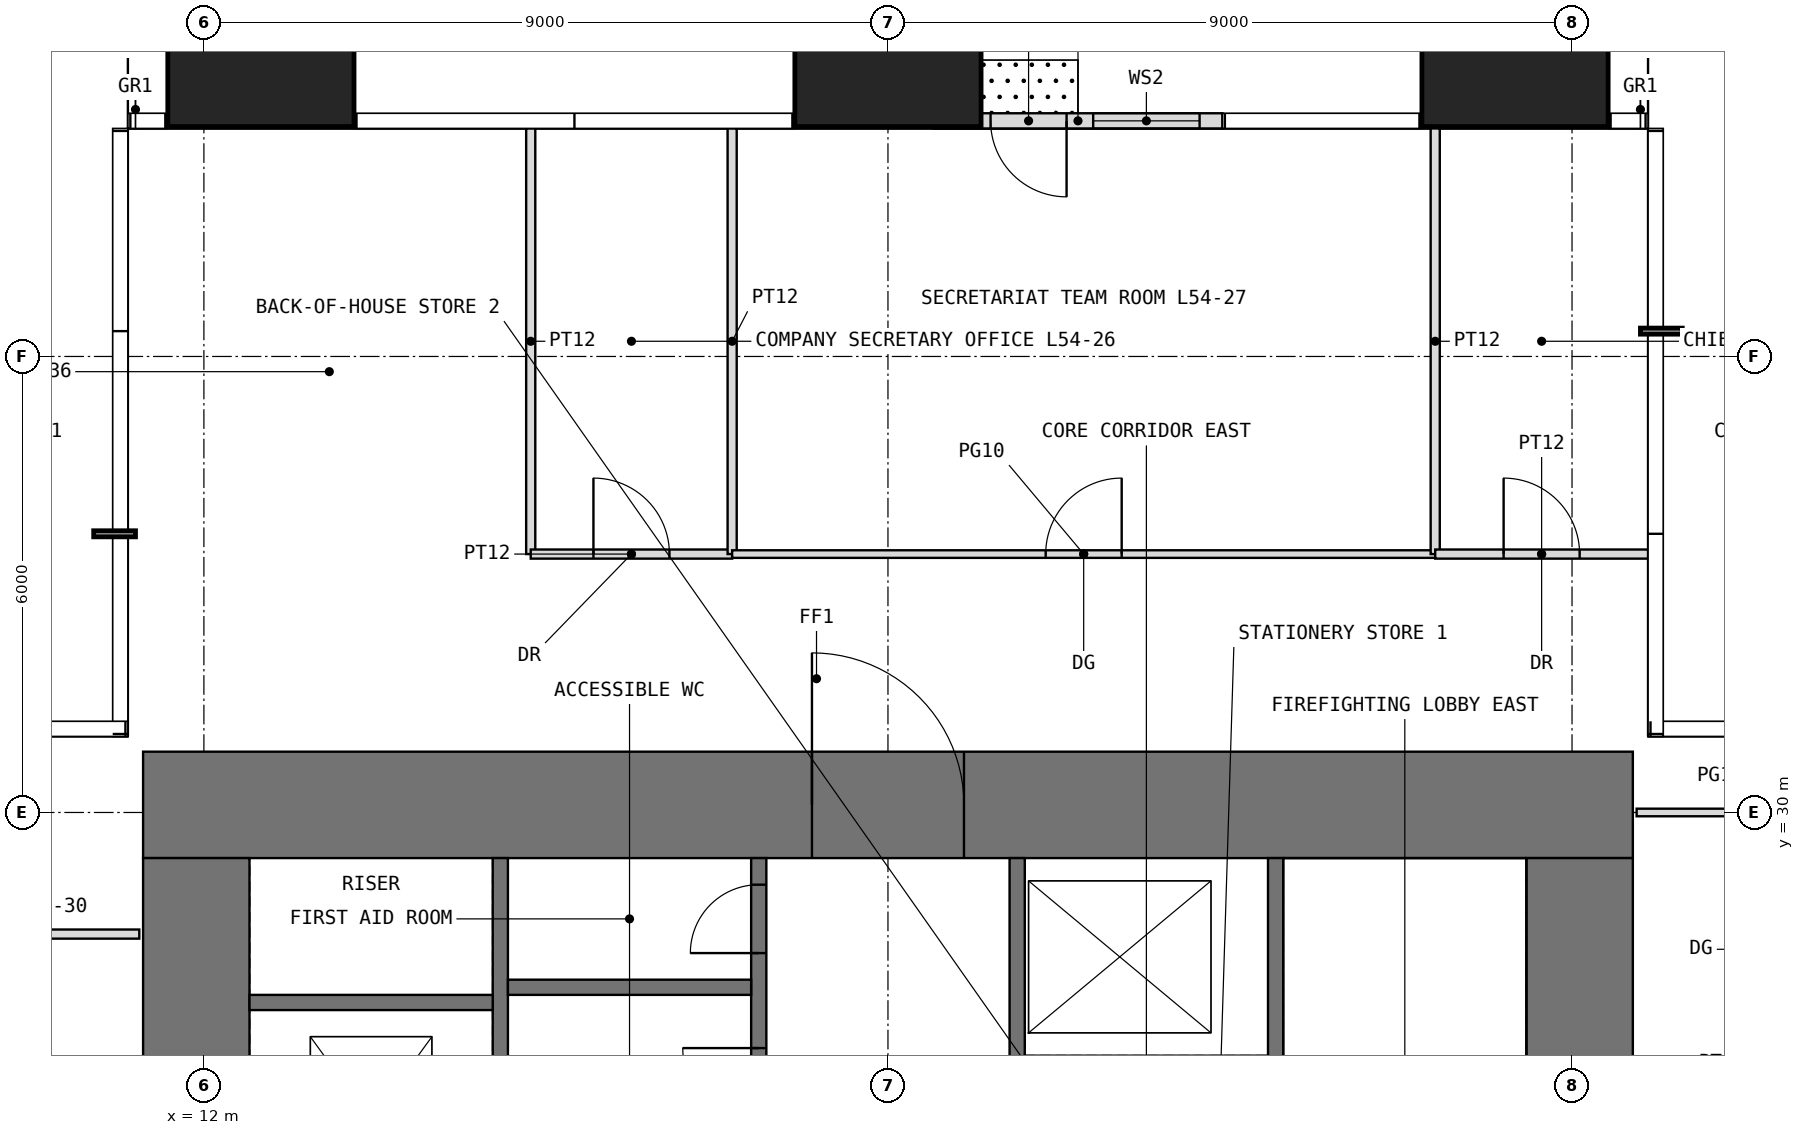
"""IFC4 building model, lengths in metres.
Left out: names, types, materials, properties, quantities, classifications, styles, units other than length and angle.
Written with IfcOpenShell. Run it as: python <this file> out.ifc"""

import sys

from ifc_helpers import new_model, si_unit, direction, frame, frame_2d, origin, origin_2d, place, context, subcontext, project, spatial, rectangle, extrude, element, fill, save


model = new_model("IFC4")
c1 = context("Model", 3, precision=1e-05, world=origin(), true_north=direction((0.0, 1.0)))
c2 = subcontext(c1, "Body", "Model", "MODEL_VIEW")
j1 = project(units=[si_unit("LENGTHUNIT", "METRE"), si_unit("PLANEANGLEUNIT", "RADIAN")], contexts=[c1])
p1 = place(None, origin())
s1 = spatial("IfcSite", under=j1, at=p1, CompositionType="ELEMENT")
p2 = place(p1, origin())
s2 = spatial("IfcBuilding", under=s1, at=p2, CompositionType="ELEMENT")
p3 = place(p2, frame((0.0, 0.0, 226.5)))
s3 = spatial("IfcBuildingStorey", under=s2, at=p3, CompositionType="ELEMENT", Elevation=226.5)
for number, where, z_axis, x_axis in (
    (1, (12.75, 40.25, 0.0), (0.0, 0.0, 1.0), (1.0, 0.0, 0.0)),
    (2, (21.0, 40.25, 0.0), (0.0, 0.0, 1.0), (1.0, 0.0, 0.0)),
    (3, (29.25, 40.25, 0.0), (0.0, 0.0, 1.0), (1.0, 0.0, 0.0)),
):
    element("IfcColumn", number, at=place(p3, frame(where, z_axis=z_axis, x_axis=x_axis)), inside=s3, PredefinedType="COLUMN", context=c2, shape_type="SweptSolid", body=[
        extrude(rectangle(XDim=2.45, YDim=2.45, at=origin_2d()), origin(), (0.0, 0.0, 1.0), 4.0),
    ])
p4 = place(p3, frame((25.4, 39.1, 0.0), z_axis=(0.0, 0.0, 1.0), x_axis=(-1.0, 0.0, 0.0)))
e4 = element("IfcWall", 4, at=p4, inside=s3, PredefinedType="USERDEFINED", context=c2, shape_type="SweptSolid", body=[
    extrude(rectangle(XDim=3.8, YDim=0.2, at=frame_2d((1.9, 0.0))), origin(), (0.0, 0.0, 1.0), 3.75),
])
p5 = place(p4, frame((2.05, 0.0, 0.0)))
e5 = element("IfcOpeningElement", 5, at=p5, cuts=e4, PredefinedType="OPENING", context=c2, shape_type="SweptSolid", body=[
    extrude(rectangle(XDim=1.0, YDim=2.4, at=frame_2d((0.5, 1.2))), frame((0.0, 0.11, 0.0), z_axis=(0.0, -1.0, 0.0), x_axis=(1.0, 0.0, 0.0)), (0.0, 0.0, 1.0), 0.22),
])
p6 = place(p4, frame((0.3, 0.0, 0.3)))
e6 = element("IfcOpeningElement", 6, at=p6, cuts=e4, PredefinedType="OPENING", context=c2, shape_type="SweptSolid", body=[
    extrude(rectangle(XDim=1.4, YDim=2.7, at=frame_2d((0.7, 1.35))), frame((0.0, 0.11, 0.0), z_axis=(0.0, -1.0, 0.0), x_axis=(1.0, 0.0, 0.0)), (0.0, 0.0, 1.0), 0.22),
])
p7 = place(p3, frame((11.2, 30.1, -0.05), z_axis=(0.0, 0.0, 1.0), x_axis=(1.0, 0.0, 0.0)))
e7 = element("IfcWall", 7, at=p7, inside=s3, PredefinedType="SHEAR", context=c2, shape_type="SweptSolid", body=[
    extrude(rectangle(XDim=19.6, YDim=1.4, at=frame_2d((9.8, 0.0))), origin(), (0.0, 0.0, 1.0), 4.0),
])
p8 = place(p7, frame((8.8, 0.0, 0.05)))
e8 = element("IfcOpeningElement", 8, at=p8, cuts=e7, PredefinedType="OPENING", context=c2, shape_type="SweptSolid", body=[
    extrude(rectangle(XDim=2.0, YDim=2.2, at=frame_2d((1.0, 1.1))), frame((0.0, 0.71, 0.0), z_axis=(0.0, -1.0, 0.0), x_axis=(1.0, 0.0, 0.0)), (0.0, 0.0, 1.0), 1.42),
])
p9 = place(p3, frame((11.9, 12.6, -0.05), z_axis=(0.0, 0.0, 1.0), x_axis=(0.0, 1.0, 0.0)))
e9 = element("IfcWall", 9, at=p9, inside=s3, PredefinedType="SHEAR", context=c2, shape_type="SweptSolid", body=[
    extrude(rectangle(XDim=16.8, YDim=1.4, at=frame_2d((8.4, 0.0))), origin(), (0.0, 0.0, 1.0), 4.0),
])
p10 = place(p9, frame((9.9, 0.0, 0.05)))
e10 = element("IfcOpeningElement", 10, at=p10, cuts=e9, PredefinedType="OPENING", context=c2, shape_type="SweptSolid", body=[
    extrude(rectangle(XDim=1.0, YDim=2.2, at=frame_2d((0.5, 1.1))), frame((0.0, 0.71, 0.0), z_axis=(0.0, -1.0, 0.0), x_axis=(1.0, 0.0, 0.0)), (0.0, 0.0, 1.0), 1.42),
])
p11 = place(p3, frame((30.1, 12.6, -0.05), z_axis=(0.0, 0.0, 1.0), x_axis=(0.0, 1.0, 0.0)))
e11 = element("IfcWall", 11, at=p11, inside=s3, PredefinedType="SHEAR", context=c2, shape_type="SweptSolid", body=[
    extrude(rectangle(XDim=16.8, YDim=1.4, at=frame_2d((8.4, 0.0))), origin(), (0.0, 0.0, 1.0), 4.0),
])
p12 = place(p11, frame((5.9, 0.0, 0.05)))
e12 = element("IfcOpeningElement", 12, at=p12, cuts=e11, PredefinedType="OPENING", context=c2, shape_type="SweptSolid", body=[
    extrude(rectangle(XDim=1.0, YDim=2.2, at=frame_2d((0.5, 1.1))), frame((0.0, 0.71, 0.0), z_axis=(0.0, -1.0, 0.0), x_axis=(1.0, 0.0, 0.0)), (0.0, 0.0, 1.0), 1.42),
])
p13 = place(p3, frame((15.9, 12.6, -0.05), z_axis=(0.0, 0.0, 1.0), x_axis=(0.0, 1.0, 0.0)))
e13 = element("IfcWall", 13, at=p13, inside=s3, PredefinedType="SHEAR", context=c2, shape_type="SweptSolid", body=[
    extrude(rectangle(XDim=16.8, YDim=0.2, at=frame_2d((8.4, 0.0))), origin(), (0.0, 0.0, 1.0), 4.0),
])
p14 = place(p13, frame((8.9, 0.0, 0.05)))
e14 = element("IfcOpeningElement", 14, at=p14, cuts=e13, PredefinedType="OPENING", context=c2, shape_type="SweptSolid", body=[
    extrude(rectangle(XDim=1.0, YDim=2.2, at=frame_2d((0.5, 1.1))), frame((0.0, 0.11, 0.0), z_axis=(0.0, -1.0, 0.0), x_axis=(1.0, 0.0, 0.0)), (0.0, 0.0, 1.0), 0.22),
])
p15 = place(p3, frame((19.3, 12.6, -0.05), z_axis=(0.0, 0.0, 1.0), x_axis=(0.0, 1.0, 0.0)))
e15 = element("IfcWall", 15, at=p15, inside=s3, PredefinedType="SHEAR", context=c2, shape_type="SweptSolid", body=[
    extrude(rectangle(XDim=16.8, YDim=0.2, at=frame_2d((8.4, 0.0))), origin(), (0.0, 0.0, 1.0), 4.0),
])
p16 = place(p15, frame((8.7, 0.0, 0.05)))
e16 = element("IfcOpeningElement", 16, at=p16, cuts=e15, PredefinedType="OPENING", context=c2, shape_type="SweptSolid", body=[
    extrude(rectangle(XDim=1.0, YDim=2.2, at=frame_2d((0.5, 1.1))), frame((0.0, 0.11, 0.0), z_axis=(0.0, -1.0, 0.0), x_axis=(1.0, 0.0, 0.0)), (0.0, 0.0, 1.0), 0.22),
])
p17 = place(p15, frame((10.85, 0.0, 0.05)))
e17 = element("IfcOpeningElement", 17, at=p17, cuts=e15, PredefinedType="OPENING", context=c2, shape_type="SweptSolid", body=[
    extrude(rectangle(XDim=0.9, YDim=2.2, at=frame_2d((0.45, 1.1))), frame((0.0, 0.11, 0.0), z_axis=(0.0, -1.0, 0.0), x_axis=(1.0, 0.0, 0.0)), (0.0, 0.0, 1.0), 0.22),
])
p18 = place(p15, frame((13.3, 0.0, 0.05)))
e18 = element("IfcOpeningElement", 18, at=p18, cuts=e15, PredefinedType="OPENING", context=c2, shape_type="SweptSolid", body=[
    extrude(rectangle(XDim=1.0, YDim=2.2, at=frame_2d((0.5, 1.1))), frame((0.0, 0.11, 0.0), z_axis=(0.0, -1.0, 0.0), x_axis=(1.0, 0.0, 0.0)), (0.0, 0.0, 1.0), 0.22),
])
p19 = place(p15, frame((15.55, 0.0, 0.05)))
e19 = element("IfcOpeningElement", 19, at=p19, cuts=e15, PredefinedType="OPENING", context=c2, shape_type="SweptSolid", body=[
    extrude(rectangle(XDim=0.9, YDim=2.2, at=frame_2d((0.45, 1.1))), frame((0.0, 0.11, 0.0), z_axis=(0.0, -1.0, 0.0), x_axis=(1.0, 0.0, 0.0)), (0.0, 0.0, 1.0), 0.22),
])
p20 = place(p15, frame((0.75, 0.0, 0.05)))
e20 = element("IfcOpeningElement", 20, at=p20, cuts=e15, PredefinedType="OPENING", context=c2, shape_type="SweptSolid", body=[
    extrude(rectangle(XDim=1.1, YDim=2.2, at=frame_2d((0.55, 1.1))), frame((0.0, 0.11, 0.0), z_axis=(0.0, -1.0, 0.0), x_axis=(1.0, 0.0, 0.0)), (0.0, 0.0, 1.0), 0.22),
])
p21 = place(p15, frame((3.55, 0.0, 0.05)))
e21 = element("IfcOpeningElement", 21, at=p21, cuts=e15, PredefinedType="OPENING", context=c2, shape_type="SweptSolid", body=[
    extrude(rectangle(XDim=1.1, YDim=2.2, at=frame_2d((0.55, 1.1))), frame((0.0, 0.11, 0.0), z_axis=(0.0, -1.0, 0.0), x_axis=(1.0, 0.0, 0.0)), (0.0, 0.0, 1.0), 0.22),
])
p22 = place(p15, frame((6.35, 0.0, 0.05)))
e22 = element("IfcOpeningElement", 22, at=p22, cuts=e15, PredefinedType="OPENING", context=c2, shape_type="SweptSolid", body=[
    extrude(rectangle(XDim=1.1, YDim=2.2, at=frame_2d((0.55, 1.1))), frame((0.0, 0.11, 0.0), z_axis=(0.0, -1.0, 0.0), x_axis=(1.0, 0.0, 0.0)), (0.0, 0.0, 1.0), 0.22),
])
p23 = place(p3, frame((22.7, 12.6, -0.05), z_axis=(0.0, 0.0, 1.0), x_axis=(0.0, 1.0, 0.0)))
e23 = element("IfcWall", 23, at=p23, inside=s3, PredefinedType="SHEAR", context=c2, shape_type="SweptSolid", body=[
    extrude(rectangle(XDim=16.8, YDim=0.2, at=frame_2d((8.4, 0.0))), origin(), (0.0, 0.0, 1.0), 4.0),
])
p24 = place(p23, frame((7.1, 0.0, 0.05)))
e24 = element("IfcOpeningElement", 24, at=p24, cuts=e23, PredefinedType="OPENING", context=c2, shape_type="SweptSolid", body=[
    extrude(rectangle(XDim=1.0, YDim=2.2, at=frame_2d((0.5, 1.1))), frame((0.0, 0.11, 0.0), z_axis=(0.0, -1.0, 0.0), x_axis=(1.0, 0.0, 0.0)), (0.0, 0.0, 1.0), 0.22),
])
p25 = place(p23, frame((1.55, 0.0, 0.05)))
e25 = element("IfcOpeningElement", 25, at=p25, cuts=e23, PredefinedType="OPENING", context=c2, shape_type="SweptSolid", body=[
    extrude(rectangle(XDim=0.9, YDim=2.2, at=frame_2d((0.45, 1.1))), frame((0.0, 0.11, 0.0), z_axis=(0.0, -1.0, 0.0), x_axis=(1.0, 0.0, 0.0)), (0.0, 0.0, 1.0), 0.22),
])
p26 = place(p23, frame((4.95, 0.0, 0.05)))
e26 = element("IfcOpeningElement", 26, at=p26, cuts=e23, PredefinedType="OPENING", context=c2, shape_type="SweptSolid", body=[
    extrude(rectangle(XDim=0.9, YDim=2.2, at=frame_2d((0.45, 1.1))), frame((0.0, 0.11, 0.0), z_axis=(0.0, -1.0, 0.0), x_axis=(1.0, 0.0, 0.0)), (0.0, 0.0, 1.0), 0.22),
])
p27 = place(p23, frame((9.4, 0.0, 0.05)))
e27 = element("IfcOpeningElement", 27, at=p27, cuts=e23, PredefinedType="OPENING", context=c2, shape_type="SweptSolid", body=[
    extrude(rectangle(XDim=1.0, YDim=2.2, at=frame_2d((0.5, 1.1))), frame((0.0, 0.11, 0.0), z_axis=(0.0, -1.0, 0.0), x_axis=(1.0, 0.0, 0.0)), (0.0, 0.0, 1.0), 0.22),
])
p28 = place(p23, frame((12.2, 0.0, 0.05)))
e28 = element("IfcOpeningElement", 28, at=p28, cuts=e23, PredefinedType="OPENING", context=c2, shape_type="SweptSolid", body=[
    extrude(rectangle(XDim=1.0, YDim=2.2, at=frame_2d((0.5, 1.1))), frame((0.0, 0.11, 0.0), z_axis=(0.0, -1.0, 0.0), x_axis=(1.0, 0.0, 0.0)), (0.0, 0.0, 1.0), 0.22),
])
p29 = place(p3, frame((26.1, 12.6, -0.05), z_axis=(0.0, 0.0, 1.0), x_axis=(0.0, 1.0, 0.0)))
e29 = element("IfcWall", 29, at=p29, inside=s3, PredefinedType="SHEAR", context=c2, shape_type="SweptSolid", body=[
    extrude(rectangle(XDim=16.8, YDim=0.2, at=frame_2d((8.4, 0.0))), origin(), (0.0, 0.0, 1.0), 4.0),
])
p30 = place(p29, frame((6.9, 0.0, 0.05)))
e30 = element("IfcOpeningElement", 30, at=p30, cuts=e29, PredefinedType="OPENING", context=c2, shape_type="SweptSolid", body=[
    extrude(rectangle(XDim=1.0, YDim=2.2, at=frame_2d((0.5, 1.1))), frame((0.0, 0.11, 0.0), z_axis=(0.0, -1.0, 0.0), x_axis=(1.0, 0.0, 0.0)), (0.0, 0.0, 1.0), 0.22),
])
for number, where, z_axis, x_axis in (
    (31, (12.6, 27.5, -0.05), (0.0, 0.0, 1.0), (1.0, 0.0, 0.0)),
    (32, (16.0, 27.7, -0.05), (0.0, 0.0, 1.0), (1.0, 0.0, 0.0)),
):
    element("IfcWall", number, at=place(p3, frame(where, z_axis=z_axis, x_axis=x_axis)), inside=s3, PredefinedType="SHEAR", context=c2, shape_type="SweptSolid", body=[
        extrude(rectangle(XDim=3.2, YDim=0.2, at=frame_2d((1.6, 0.0))), origin(), (0.0, 0.0, 1.0), 4.0),
    ])
p31 = place(p3, frame((8.2, 28.4, 0.0), z_axis=(0.0, 0.0, 1.0), x_axis=(1.0, 0.0, 0.0)))
e33 = element("IfcWall", 33, at=p31, inside=s3, PredefinedType="PARTITIONING", context=c2, shape_type="SweptSolid", body=[
    extrude(rectangle(XDim=2.95, YDim=0.12, at=frame_2d((1.475, 0.0))), origin(), (0.0, 0.0, 1.0), 3.75),
])
p32 = place(p3, frame((16.3, 33.4, 0.0), z_axis=(0.0, 0.0, 1.0), x_axis=(0.0, 1.0, 0.0)))
e34 = element("IfcWall", 34, at=p32, inside=s3, PredefinedType="PARTITIONING", context=c2, shape_type="SweptSolid", body=[
    extrude(rectangle(XDim=5.6, YDim=0.12, at=frame_2d((2.8, 0.0))), origin(), (0.0, 0.0, 1.0), 3.75),
])
p33 = place(p3, frame((16.3, 33.4, 0.0), z_axis=(0.0, 0.0, 1.0), x_axis=(1.0, 0.0, 0.0)))
e35 = element("IfcWall", 35, at=p33, inside=s3, PredefinedType="PARTITIONING", context=c2, shape_type="SweptSolid", body=[
    extrude(rectangle(XDim=2.65, YDim=0.12, at=frame_2d((1.325, 0.0))), origin(), (0.0, 0.0, 1.0), 3.75),
])
p34 = place(p33, frame((0.825, 0.0, 0.0)))
e36 = element("IfcOpeningElement", 36, at=p34, cuts=e35, PredefinedType="OPENING", context=c2, shape_type="SweptSolid", body=[
    extrude(rectangle(XDim=1.0, YDim=2.2, at=frame_2d((0.5, 1.1))), frame((0.0, 0.07, 0.0), z_axis=(0.0, -1.0, 0.0), x_axis=(1.0, 0.0, 0.0)), (0.0, 0.0, 1.0), 0.14),
])
p35 = place(p3, frame((18.95, 33.4, 0.0), z_axis=(0.0, 0.0, 1.0), x_axis=(0.0, 1.0, 0.0)))
e37 = element("IfcWall", 37, at=p35, inside=s3, PredefinedType="PARTITIONING", context=c2, shape_type="SweptSolid", body=[
    extrude(rectangle(XDim=5.6, YDim=0.12, at=frame_2d((2.8, 0.0))), origin(), (0.0, 0.0, 1.0), 3.75),
])
p36 = place(p3, frame((18.95, 33.4, 0.0), z_axis=(0.0, 0.0, 1.0), x_axis=(1.0, 0.0, 0.0)))
e38 = element("IfcWall", 38, at=p36, inside=s3, PredefinedType="PARTITIONING", context=c2, shape_type="SweptSolid", body=[
    extrude(rectangle(XDim=9.25, YDim=0.1, at=frame_2d((4.625, 0.0))), origin(), (0.0, 0.0, 1.0), 3.75),
])
p37 = place(p36, frame((4.125, 0.0, 0.0)))
e39 = element("IfcOpeningElement", 39, at=p37, cuts=e38, PredefinedType="OPENING", context=c2, shape_type="SweptSolid", body=[
    extrude(rectangle(XDim=1.0, YDim=2.4, at=frame_2d((0.5, 1.2))), frame((0.0, 0.06, 0.0), z_axis=(0.0, -1.0, 0.0), x_axis=(1.0, 0.0, 0.0)), (0.0, 0.0, 1.0), 0.12),
])
p38 = place(p3, frame((28.2, 33.4, 0.0), z_axis=(0.0, 0.0, 1.0), x_axis=(0.0, 1.0, 0.0)))
e40 = element("IfcWall", 40, at=p38, inside=s3, PredefinedType="PARTITIONING", context=c2, shape_type="SweptSolid", body=[
    extrude(rectangle(XDim=5.6, YDim=0.12, at=frame_2d((2.8, 0.0))), origin(), (0.0, 0.0, 1.0), 3.75),
])
p39 = place(p3, frame((28.2, 33.4, 0.0), z_axis=(0.0, 0.0, 1.0), x_axis=(1.0, 0.0, 0.0)))
e41 = element("IfcWall", 41, at=p39, inside=s3, PredefinedType="PARTITIONING", context=c2, shape_type="SweptSolid", body=[
    extrude(rectangle(XDim=2.8, YDim=0.12, at=frame_2d((1.4, 0.0))), origin(), (0.0, 0.0, 1.0), 3.75),
])
p40 = place(p39, frame((0.9, 0.0, 0.0)))
e42 = element("IfcOpeningElement", 42, at=p40, cuts=e41, PredefinedType="OPENING", context=c2, shape_type="SweptSolid", body=[
    extrude(rectangle(XDim=1.0, YDim=2.2, at=frame_2d((0.5, 1.1))), frame((0.0, 0.07, 0.0), z_axis=(0.0, -1.0, 0.0), x_axis=(1.0, 0.0, 0.0)), (0.0, 0.0, 1.0), 0.14),
])
p41 = place(p3, frame((30.85, 30.0, 0.0), z_axis=(0.0, 0.0, 1.0), x_axis=(1.0, 0.0, 0.0)))
e43 = element("IfcWall", 43, at=p41, inside=s3, PredefinedType="PARTITIONING", context=c2, shape_type="SweptSolid", body=[
    extrude(rectangle(XDim=2.75, YDim=0.1, at=frame_2d((1.375, 0.0))), origin(), (0.0, 0.0, 1.0), 3.75),
])
p42 = place(p5, origin())
e44 = element("IfcDoor", 44, at=p42, inside=s3, OperationType="SINGLE_SWING_LEFT", PredefinedType="DOOR", context=c2, shape_type="SweptSolid", body=[
    extrude(rectangle(XDim=1.0, YDim=2.4, at=frame_2d((0.5, 1.2))), frame((0.0, 0.025, 0.0), z_axis=(0.0, -1.0, 0.0), x_axis=(1.0, 0.0, 0.0)), (0.0, 0.0, 1.0), 0.05),
])
fill(e5, e44)
p43 = place(p6, origin())
e45 = element("IfcWindow", 45, at=p43, inside=s3, PartitioningType="SINGLE_PANEL", PredefinedType="WINDOW", context=c2, shape_type="SweptSolid", body=[
    extrude(rectangle(XDim=1.4, YDim=2.7, at=frame_2d((0.7, 1.35))), frame((0.0, 0.03, 0.0), z_axis=(0.0, -1.0, 0.0), x_axis=(1.0, 0.0, 0.0)), (0.0, 0.0, 1.0), 0.06),
])
fill(e6, e45)
p44 = place(p8, origin())
e46 = element("IfcDoor", 46, at=p44, inside=s3, OperationType="DOUBLE_DOOR_SINGLE_SWING", PredefinedType="DOOR", context=c2, shape_type="SweptSolid", body=[
    extrude(rectangle(XDim=2.0, YDim=2.2, at=frame_2d((1.0, 1.1))), frame((0.0, 0.025, 0.0), z_axis=(0.0, -1.0, 0.0), x_axis=(1.0, 0.0, 0.0)), (0.0, 0.0, 1.0), 0.05),
])
fill(e8, e46)
p45 = place(p18, origin())
e47 = element("IfcDoor", 47, at=p45, inside=s3, OperationType="SINGLE_SWING_RIGHT", PredefinedType="DOOR", context=c2, shape_type="SweptSolid", body=[
    extrude(rectangle(XDim=1.0, YDim=2.2, at=frame_2d((0.5, 1.1))), frame((0.0, 0.025, 0.0), z_axis=(0.0, -1.0, 0.0), x_axis=(1.0, 0.0, 0.0)), (0.0, 0.0, 1.0), 0.05),
])
fill(e18, e47)
p46 = place(p19, origin())
e48 = element("IfcDoor", 48, at=p46, inside=s3, OperationType="SINGLE_SWING_LEFT", PredefinedType="DOOR", context=c2, shape_type="SweptSolid", body=[
    extrude(rectangle(XDim=0.9, YDim=2.2, at=frame_2d((0.45, 1.1))), frame((0.0, 0.025, 0.0), z_axis=(0.0, -1.0, 0.0), x_axis=(1.0, 0.0, 0.0)), (0.0, 0.0, 1.0), 0.05),
])
fill(e19, e48)
p47 = place(p34, origin())
e49 = element("IfcDoor", 49, at=p47, inside=s3, OperationType="SINGLE_SWING_LEFT", PredefinedType="DOOR", context=c2, shape_type="SweptSolid", body=[
    extrude(rectangle(XDim=1.0, YDim=2.2, at=frame_2d((0.5, 1.1))), frame((0.0, 0.025, 0.0), z_axis=(0.0, -1.0, 0.0), x_axis=(1.0, 0.0, 0.0)), (0.0, 0.0, 1.0), 0.05),
])
fill(e36, e49)
p48 = place(p37, origin())
e50 = element("IfcDoor", 50, at=p48, inside=s3, OperationType="SINGLE_SWING_RIGHT", PredefinedType="DOOR", context=c2, shape_type="SweptSolid", body=[
    extrude(rectangle(XDim=1.0, YDim=2.4, at=frame_2d((0.5, 1.2))), frame((0.0, 0.025, 0.0), z_axis=(0.0, -1.0, 0.0), x_axis=(1.0, 0.0, 0.0)), (0.0, 0.0, 1.0), 0.05),
])
fill(e39, e50)
p49 = place(p40, origin())
e51 = element("IfcDoor", 51, at=p49, inside=s3, OperationType="SINGLE_SWING_LEFT", PredefinedType="DOOR", context=c2, shape_type="SweptSolid", body=[
    extrude(rectangle(XDim=1.0, YDim=2.2, at=frame_2d((0.5, 1.1))), frame((0.0, 0.025, 0.0), z_axis=(0.0, -1.0, 0.0), x_axis=(1.0, 0.0, 0.0)), (0.0, 0.0, 1.0), 0.05),
])
fill(e42, e51)
save(model, sys.argv[1])
